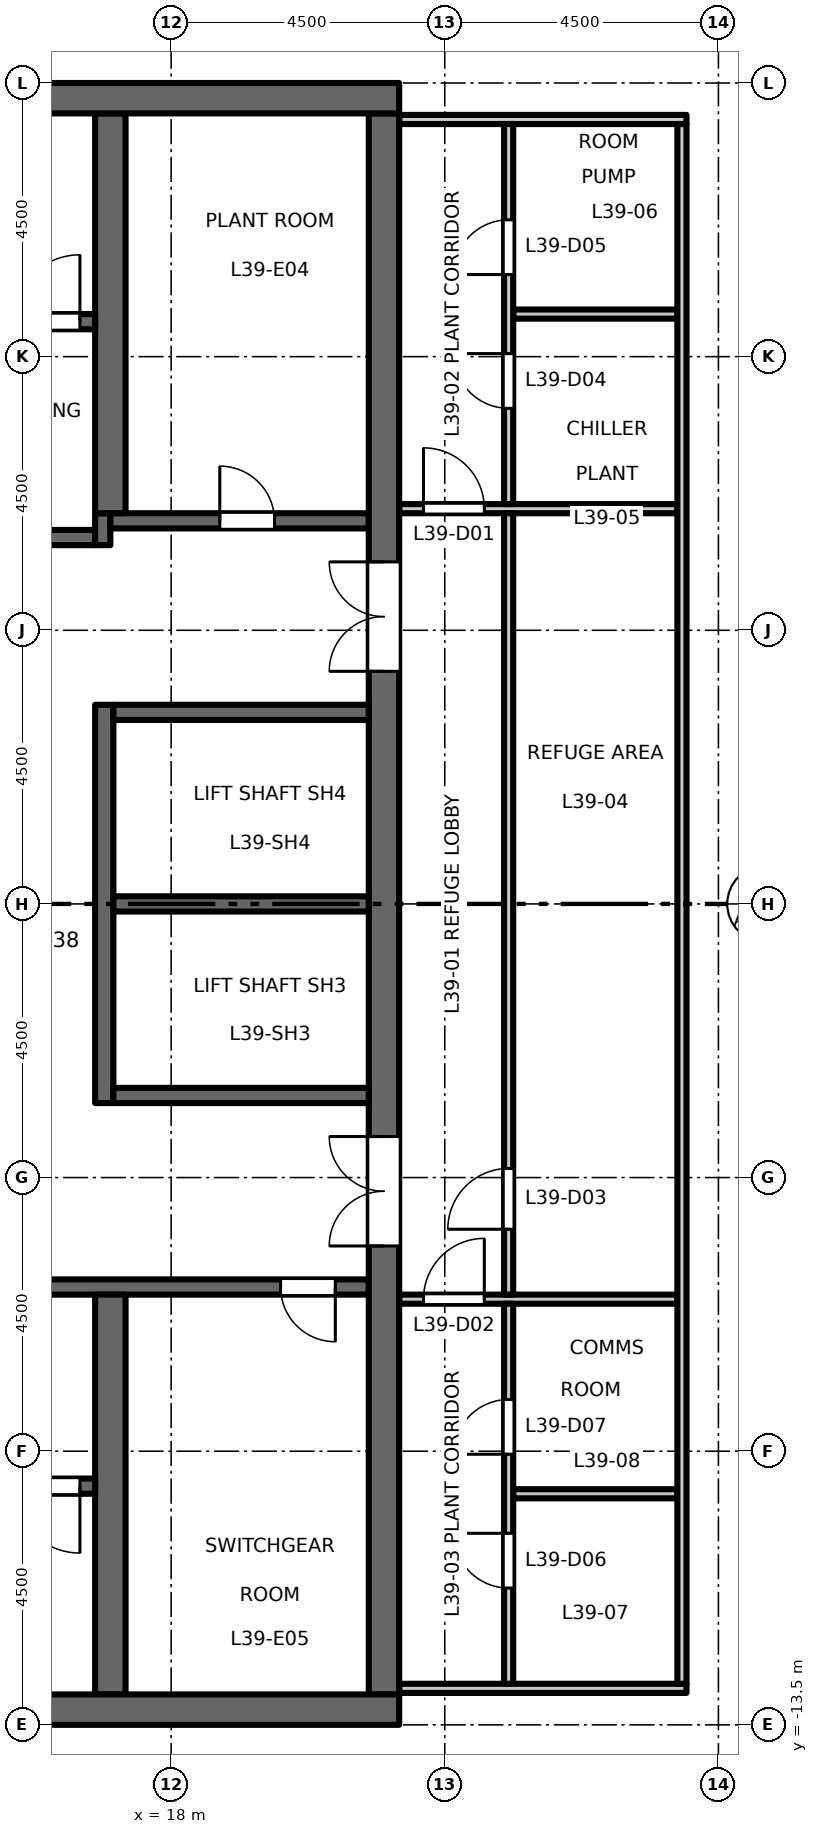
"""IFC4 building model, lengths in metres.
Left out: names, types, materials, properties, quantities, classifications, styles, units other than length and angle.
Written with IfcOpenShell. Run it as: python <this file> out.ifc"""

import sys

from ifc_helpers import new_model, si_unit, direction, frame, frame_2d, origin, place, context, subcontext, project, spatial, rectangle, extrude, element, fill, save


model = new_model("IFC4")
c1 = context("Model", 3, precision=1e-05, world=origin(), true_north=direction((0.0, 1.0)))
c2 = subcontext(c1, "Body", "Model", "MODEL_VIEW")
j1 = project(units=[si_unit("LENGTHUNIT", "METRE"), si_unit("PLANEANGLEUNIT", "RADIAN")], contexts=[c1])
p1 = place(None, origin())
s1 = spatial("IfcSite", under=j1, at=p1, CompositionType="ELEMENT")
p2 = place(p1, origin())
s2 = spatial("IfcBuilding", under=s1, at=p2, CompositionType="ELEMENT")
p3 = place(p2, frame((0.0, 0.0, 181.2)))
s3 = spatial("IfcBuildingStorey", under=s2, at=p3, CompositionType="ELEMENT", Elevation=181.2)
p4 = place(p3, frame((12.15, 6.025, 0.0), z_axis=(0.0, 0.0, 1.0), x_axis=(1.0, 0.0, 0.0)))
e1 = element("IfcWall", 1, at=p4, inside=s3, PredefinedType="SHEAR", context=c2, shape_type="SweptSolid", body=[
    extrude(rectangle(XDim=4.6, YDim=0.25, at=frame_2d((2.3, 0.0))), origin(), (0.0, 0.0, 1.0), 5.8),
])
p5 = place(p4, frame((1.8, 0.0, 0.0)))
e2 = element("IfcOpeningElement", 2, at=p5, cuts=e1, PredefinedType="OPENING", context=c2, shape_type="SweptSolid", body=[
    extrude(rectangle(XDim=1.0, YDim=2.1, at=frame_2d((0.5, 1.05))), frame((0.0, 0.135, 0.0), z_axis=(0.0, -1.0, 0.0), x_axis=(1.0, 0.0, 0.0)), (0.0, 0.0, 1.0), 0.27),
])
p6 = place(p3, frame((16.875, 5.9, 0.0), z_axis=(0.0, 0.0, 1.0), x_axis=(0.0, 1.0, 0.0)))
e3 = element("IfcWall", 3, at=p6, inside=s3, PredefinedType="SHEAR", context=c2, shape_type="SweptSolid", body=[
    extrude(rectangle(XDim=0.525, YDim=0.25, at=frame_2d((0.263, 0.0))), origin(), (0.0, 0.0, 1.0), 5.8),
])
p7 = place(p3, frame((17.0, 6.3, 0.0), z_axis=(0.0, 0.0, 1.0), x_axis=(1.0, 0.0, 0.0)))
e4 = element("IfcWall", 4, at=p7, inside=s3, PredefinedType="SHEAR", context=c2, shape_type="SweptSolid", body=[
    extrude(rectangle(XDim=4.25, YDim=0.25, at=frame_2d((2.125, 0.0))), origin(), (0.0, 0.0, 1.0), 5.8),
])
p8 = place(p7, frame((1.8, 0.0, 0.0)))
e5 = element("IfcOpeningElement", 5, at=p8, cuts=e4, PredefinedType="OPENING", context=c2, shape_type="SweptSolid", body=[
    extrude(rectangle(XDim=0.9, YDim=2.1, at=frame_2d((0.45, 1.05))), frame((0.0, 0.135, 0.0), z_axis=(0.0, -1.0, 0.0), x_axis=(1.0, 0.0, 0.0)), (0.0, 0.0, 1.0), 0.27),
])
p9 = place(p3, frame((12.15, -6.3, 0.0), z_axis=(0.0, 0.0, 1.0), x_axis=(1.0, 0.0, 0.0)))
e6 = element("IfcWall", 6, at=p9, inside=s3, PredefinedType="SHEAR", context=c2, shape_type="SweptSolid", body=[
    extrude(rectangle(XDim=9.1, YDim=0.25, at=frame_2d((4.55, 0.0))), origin(), (0.0, 0.0, 1.0), 5.8),
])
p10 = place(p9, frame((1.8, 0.0, 0.0)))
e7 = element("IfcOpeningElement", 7, at=p10, cuts=e6, PredefinedType="OPENING", context=c2, shape_type="SweptSolid", body=[
    extrude(rectangle(XDim=1.0, YDim=2.1, at=frame_2d((0.5, 1.05))), frame((0.0, 0.135, 0.0), z_axis=(0.0, -1.0, 0.0), x_axis=(1.0, 0.0, 0.0)), (0.0, 0.0, 1.0), 0.27),
])
p11 = place(p9, frame((7.65, 0.0, 0.0)))
e8 = element("IfcOpeningElement", 8, at=p11, cuts=e6, PredefinedType="OPENING", context=c2, shape_type="SweptSolid", body=[
    extrude(rectangle(XDim=0.9, YDim=2.1, at=frame_2d((0.45, 1.05))), frame((0.0, 0.135, 0.0), z_axis=(0.0, -1.0, 0.0), x_axis=(1.0, 0.0, 0.0)), (0.0, 0.0, 1.0), 0.27),
])
p12 = place(p3, frame((21.5, -13.0, 0.0), z_axis=(0.0, 0.0, 1.0), x_axis=(0.0, 1.0, 0.0)))
e9 = element("IfcWall", 9, at=p12, inside=s3, PredefinedType="SHEAR", context=c2, shape_type="SweptSolid", body=[
    extrude(rectangle(XDim=26.0, YDim=0.5, at=frame_2d((13.0, 0.0))), origin(), (0.0, 0.0, 1.0), 5.8),
])
p13 = place(p12, frame((16.825, 0.0, 0.0)))
e10 = element("IfcOpeningElement", 10, at=p13, cuts=e9, PredefinedType="OPENING", context=c2, shape_type="SweptSolid", body=[
    extrude(rectangle(XDim=1.8, YDim=2.1, at=frame_2d((0.9, 1.05))), frame((0.0, 0.26, 0.0), z_axis=(0.0, -1.0, 0.0), x_axis=(1.0, 0.0, 0.0)), (0.0, 0.0, 1.0), 0.52),
])
p14 = place(p12, frame((7.375, 0.0, 0.0)))
e11 = element("IfcOpeningElement", 11, at=p14, cuts=e9, PredefinedType="OPENING", context=c2, shape_type="SweptSolid", body=[
    extrude(rectangle(XDim=1.8, YDim=2.1, at=frame_2d((0.9, 1.05))), frame((0.0, 0.26, 0.0), z_axis=(0.0, -1.0, 0.0), x_axis=(1.0, 0.0, 0.0)), (0.0, 0.0, 1.0), 0.52),
])
p15 = place(p3, frame((16.9, -3.275, 0.0), z_axis=(0.0, 0.0, 1.0), x_axis=(0.0, 1.0, 0.0)))
e12 = element("IfcWall", 12, at=p15, inside=s3, PredefinedType="SHEAR", context=c2, shape_type="SweptSolid", body=[
    extrude(rectangle(XDim=6.55, YDim=0.3, at=frame_2d((3.275, 0.0))), origin(), (0.0, 0.0, 1.0), 5.8),
])
for number, where, z_axis, x_axis in (
    (13, (17.05, 0.0, 0.0), (0.0, 0.0, 1.0), (1.0, 0.0, 0.0)),
    (14, (17.05, 3.15, 0.0), (0.0, 0.0, 1.0), (1.0, 0.0, 0.0)),
    (15, (17.05, -3.15, 0.0), (0.0, 0.0, 1.0), (1.0, 0.0, 0.0)),
):
    element("IfcWall", number, at=place(p3, frame(where, z_axis=z_axis, x_axis=x_axis)), inside=s3, PredefinedType="SHEAR", context=c2, shape_type="SweptSolid", body=[
        extrude(rectangle(XDim=4.2, YDim=0.25, at=frame_2d((2.1, 0.0))), origin(), (0.0, 0.0, 1.0), 5.8),
    ])
for number, where, z_axis, x_axis in (
    (16, (17.0, 6.425, 0.0), (0.0, 0.0, 1.0), (0.0, 1.0, 0.0)),
    (17, (17.0, -13.0, 0.0), (0.0, 0.0, 1.0), (0.0, 1.0, 0.0)),
):
    element("IfcWall", number, at=place(p3, frame(where, z_axis=z_axis, x_axis=x_axis)), inside=s3, PredefinedType="SHEAR", context=c2, shape_type="SweptSolid", body=[
        extrude(rectangle(XDim=6.575, YDim=0.5, at=frame_2d((3.288, 0.0))), origin(), (0.0, 0.0, 1.0), 5.8),
    ])
p16 = place(p3, frame((8.75, 9.575, 0.0), z_axis=(0.0, 0.0, 1.0), x_axis=(1.0, 0.0, 0.0)))
e18 = element("IfcWall", 18, at=p16, inside=s3, PredefinedType="SHEAR", context=c2, shape_type="SweptSolid", body=[
    extrude(rectangle(XDim=8.0, YDim=0.25, at=frame_2d((4.0, 0.0))), origin(), (0.0, 0.0, 1.0), 5.8),
])
p17 = place(p16, frame((6.65, 0.0, 0.0)))
e19 = element("IfcOpeningElement", 19, at=p17, cuts=e18, PredefinedType="OPENING", context=c2, shape_type="SweptSolid", body=[
    extrude(rectangle(XDim=1.1, YDim=2.1, at=frame_2d((0.55, 1.05))), frame((0.0, 0.135, 0.0), z_axis=(0.0, -1.0, 0.0), x_axis=(1.0, 0.0, 0.0)), (0.0, 0.0, 1.0), 0.27),
])
p18 = place(p3, frame((8.75, -9.575, 0.0), z_axis=(0.0, 0.0, 1.0), x_axis=(1.0, 0.0, 0.0)))
e20 = element("IfcWall", 20, at=p18, inside=s3, PredefinedType="SHEAR", context=c2, shape_type="SweptSolid", body=[
    extrude(rectangle(XDim=8.0, YDim=0.25, at=frame_2d((4.0, 0.0))), origin(), (0.0, 0.0, 1.0), 5.8),
])
p19 = place(p18, frame((6.65, 0.0, 0.0)))
e21 = element("IfcOpeningElement", 21, at=p19, cuts=e20, PredefinedType="OPENING", context=c2, shape_type="SweptSolid", body=[
    extrude(rectangle(XDim=1.1, YDim=2.1, at=frame_2d((0.55, 1.05))), frame((0.0, 0.135, 0.0), z_axis=(0.0, -1.0, 0.0), x_axis=(1.0, 0.0, 0.0)), (0.0, 0.0, 1.0), 0.27),
])
for number, where, z_axis, x_axis in (
    (22, (8.25, 13.25, 0.0), (0.0, 0.0, 1.0), (1.0, 0.0, 0.0)),
    (23, (8.25, -13.25, 0.0), (0.0, 0.0, 1.0), (1.0, 0.0, 0.0)),
):
    element("IfcWall", number, at=place(p3, frame(where, z_axis=z_axis, x_axis=x_axis)), inside=s3, PredefinedType="SHEAR", context=c2, shape_type="SweptSolid", body=[
        extrude(rectangle(XDim=13.5, YDim=0.5, at=frame_2d((6.75, 0.0))), origin(), (0.0, 0.0, 1.0), 5.8),
    ])
p20 = place(p3, frame((21.75, -12.9, 0.0), z_axis=(0.0, 0.0, 1.0), x_axis=(1.0, 0.0, 0.0)))
e24 = element("IfcWall", 24, at=p20, inside=s3, PredefinedType="PARTITIONING", context=c2, shape_type="SweptSolid", body=[
    extrude(rectangle(XDim=4.725, YDim=0.15, at=frame_2d((2.363, 0.0))), origin(), (0.0, 0.0, 1.0), 5.8),
])
p21 = place(p3, frame((23.625, -9.7, 0.0), z_axis=(0.0, 0.0, 1.0), x_axis=(1.0, 0.0, 0.0)))
e25 = element("IfcWall", 25, at=p21, inside=s3, PredefinedType="PARTITIONING", context=c2, shape_type="SweptSolid", body=[
    extrude(rectangle(XDim=2.7, YDim=0.15, at=frame_2d((1.35, 0.0))), origin(), (0.0, 0.0, 1.0), 5.8),
])
p22 = place(p3, frame((21.75, -6.5, 0.0), z_axis=(0.0, 0.0, 1.0), x_axis=(1.0, 0.0, 0.0)))
e26 = element("IfcWall", 26, at=p22, inside=s3, PredefinedType="PARTITIONING", context=c2, shape_type="SweptSolid", body=[
    extrude(rectangle(XDim=4.575, YDim=0.15, at=frame_2d((2.288, 0.0))), origin(), (0.0, 0.0, 1.0), 5.8),
])
p23 = place(p22, frame((0.4, 0.0, 0.0)))
e27 = element("IfcOpeningElement", 27, at=p23, cuts=e26, PredefinedType="OPENING", context=c2, shape_type="SweptSolid", body=[
    extrude(rectangle(XDim=1.0, YDim=2.1, at=frame_2d((0.5, 1.05))), frame((0.0, 0.085, 0.0), z_axis=(0.0, -1.0, 0.0), x_axis=(1.0, 0.0, 0.0)), (0.0, 0.0, 1.0), 0.17),
])
p24 = place(p3, frame((21.75, 6.5, 0.0), z_axis=(0.0, 0.0, 1.0), x_axis=(1.0, 0.0, 0.0)))
e28 = element("IfcWall", 28, at=p24, inside=s3, PredefinedType="PARTITIONING", context=c2, shape_type="SweptSolid", body=[
    extrude(rectangle(XDim=4.575, YDim=0.15, at=frame_2d((2.288, 0.0))), origin(), (0.0, 0.0, 1.0), 5.8),
])
p25 = place(p24, frame((0.4, 0.0, 0.0)))
e29 = element("IfcOpeningElement", 29, at=p25, cuts=e28, PredefinedType="OPENING", context=c2, shape_type="SweptSolid", body=[
    extrude(rectangle(XDim=1.0, YDim=2.1, at=frame_2d((0.5, 1.05))), frame((0.0, 0.085, 0.0), z_axis=(0.0, -1.0, 0.0), x_axis=(1.0, 0.0, 0.0)), (0.0, 0.0, 1.0), 0.17),
])
p26 = place(p3, frame((23.625, 9.7, 0.0), z_axis=(0.0, 0.0, 1.0), x_axis=(1.0, 0.0, 0.0)))
e30 = element("IfcWall", 30, at=p26, inside=s3, PredefinedType="PARTITIONING", context=c2, shape_type="SweptSolid", body=[
    extrude(rectangle(XDim=2.7, YDim=0.15, at=frame_2d((1.35, 0.0))), origin(), (0.0, 0.0, 1.0), 5.8),
])
p27 = place(p3, frame((21.75, 12.9, 0.0), z_axis=(0.0, 0.0, 1.0), x_axis=(1.0, 0.0, 0.0)))
e31 = element("IfcWall", 31, at=p27, inside=s3, PredefinedType="PARTITIONING", context=c2, shape_type="SweptSolid", body=[
    extrude(rectangle(XDim=4.725, YDim=0.15, at=frame_2d((2.363, 0.0))), origin(), (0.0, 0.0, 1.0), 5.8),
])
p28 = place(p3, frame((23.55, -12.825, 0.0), z_axis=(0.0, 0.0, 1.0), x_axis=(0.0, 1.0, 0.0)))
e32 = element("IfcWall", 32, at=p28, inside=s3, PredefinedType="PARTITIONING", context=c2, shape_type="SweptSolid", body=[
    extrude(rectangle(XDim=6.25, YDim=0.15, at=frame_2d((3.125, 0.0))), origin(), (0.0, 0.0, 1.0), 5.8),
])
p29 = place(p28, frame((1.575, 0.0, 0.0)))
e33 = element("IfcOpeningElement", 33, at=p29, cuts=e32, PredefinedType="OPENING", context=c2, shape_type="SweptSolid", body=[
    extrude(rectangle(XDim=0.9, YDim=2.1, at=frame_2d((0.45, 1.05))), frame((0.0, 0.085, 0.0), z_axis=(0.0, -1.0, 0.0), x_axis=(1.0, 0.0, 0.0)), (0.0, 0.0, 1.0), 0.17),
])
p30 = place(p28, frame((3.775, 0.0, 0.0)))
e34 = element("IfcOpeningElement", 34, at=p30, cuts=e32, PredefinedType="OPENING", context=c2, shape_type="SweptSolid", body=[
    extrude(rectangle(XDim=0.9, YDim=2.1, at=frame_2d((0.45, 1.05))), frame((0.0, 0.085, 0.0), z_axis=(0.0, -1.0, 0.0), x_axis=(1.0, 0.0, 0.0)), (0.0, 0.0, 1.0), 0.17),
])
p31 = place(p3, frame((23.55, -6.425, 0.0), z_axis=(0.0, 0.0, 1.0), x_axis=(0.0, 1.0, 0.0)))
e35 = element("IfcWall", 35, at=p31, inside=s3, PredefinedType="PARTITIONING", context=c2, shape_type="SweptSolid", body=[
    extrude(rectangle(XDim=12.85, YDim=0.15, at=frame_2d((6.425, 0.0))), origin(), (0.0, 0.0, 1.0), 5.8),
])
p32 = place(p31, frame((1.075, 0.0, 0.0)))
e36 = element("IfcOpeningElement", 36, at=p32, cuts=e35, PredefinedType="OPENING", context=c2, shape_type="SweptSolid", body=[
    extrude(rectangle(XDim=1.0, YDim=2.1, at=frame_2d((0.5, 1.05))), frame((0.0, 0.085, 0.0), z_axis=(0.0, -1.0, 0.0), x_axis=(1.0, 0.0, 0.0)), (0.0, 0.0, 1.0), 0.17),
])
p33 = place(p3, frame((23.55, 6.575, 0.0), z_axis=(0.0, 0.0, 1.0), x_axis=(0.0, 1.0, 0.0)))
e37 = element("IfcWall", 37, at=p33, inside=s3, PredefinedType="PARTITIONING", context=c2, shape_type="SweptSolid", body=[
    extrude(rectangle(XDim=6.25, YDim=0.15, at=frame_2d((3.125, 0.0))), origin(), (0.0, 0.0, 1.0), 5.8),
])
p34 = place(p33, frame((1.575, 0.0, 0.0)))
e38 = element("IfcOpeningElement", 38, at=p34, cuts=e37, PredefinedType="OPENING", context=c2, shape_type="SweptSolid", body=[
    extrude(rectangle(XDim=0.9, YDim=2.1, at=frame_2d((0.45, 1.05))), frame((0.0, 0.085, 0.0), z_axis=(0.0, -1.0, 0.0), x_axis=(1.0, 0.0, 0.0)), (0.0, 0.0, 1.0), 0.17),
])
p35 = place(p33, frame((3.775, 0.0, 0.0)))
e39 = element("IfcOpeningElement", 39, at=p35, cuts=e37, PredefinedType="OPENING", context=c2, shape_type="SweptSolid", body=[
    extrude(rectangle(XDim=0.9, YDim=2.1, at=frame_2d((0.45, 1.05))), frame((0.0, 0.085, 0.0), z_axis=(0.0, -1.0, 0.0), x_axis=(1.0, 0.0, 0.0)), (0.0, 0.0, 1.0), 0.17),
])
p36 = place(p3, frame((26.4, -12.825, 0.0), z_axis=(0.0, 0.0, 1.0), x_axis=(0.0, 1.0, 0.0)))
e40 = element("IfcWall", 40, at=p36, inside=s3, PredefinedType="PARTITIONING", context=c2, shape_type="SweptSolid", body=[
    extrude(rectangle(XDim=25.65, YDim=0.15, at=frame_2d((12.825, 0.0))), origin(), (0.0, 0.0, 1.0), 5.8),
])
p37 = place(p17, origin())
e41 = element("IfcDoor", 41, at=p37, inside=s3, OperationType="SINGLE_SWING_LEFT", PredefinedType="DOOR", context=c2, shape_type="SweptSolid", body=[
    extrude(rectangle(XDim=1.1, YDim=2.1, at=frame_2d((0.55, 1.05))), frame((0.0, 0.025, 0.0), z_axis=(0.0, -1.0, 0.0), x_axis=(1.0, 0.0, 0.0)), (0.0, 0.0, 1.0), 0.05),
])
fill(e19, e41)
p38 = place(p19, origin())
e42 = element("IfcDoor", 42, at=p38, inside=s3, OperationType="SINGLE_SWING_RIGHT", PredefinedType="DOOR", context=c2, shape_type="SweptSolid", body=[
    extrude(rectangle(XDim=1.1, YDim=2.1, at=frame_2d((0.55, 1.05))), frame((0.0, 0.025, 0.0), z_axis=(0.0, -1.0, 0.0), x_axis=(1.0, 0.0, 0.0)), (0.0, 0.0, 1.0), 0.05),
])
fill(e21, e42)
p39 = place(p13, origin())
e43 = element("IfcDoor", 43, at=p39, inside=s3, OperationType="DOUBLE_DOOR_DOUBLE_SWING", PredefinedType="DOOR", context=c2, shape_type="SweptSolid", body=[
    extrude(rectangle(XDim=1.8, YDim=2.1, at=frame_2d((0.9, 1.05))), frame((0.0, 0.025, 0.0), z_axis=(0.0, -1.0, 0.0), x_axis=(1.0, 0.0, 0.0)), (0.0, 0.0, 1.0), 0.05),
])
fill(e10, e43)
p40 = place(p14, origin())
e44 = element("IfcDoor", 44, at=p40, inside=s3, OperationType="DOUBLE_DOOR_DOUBLE_SWING", PredefinedType="DOOR", context=c2, shape_type="SweptSolid", body=[
    extrude(rectangle(XDim=1.8, YDim=2.1, at=frame_2d((0.9, 1.05))), frame((0.0, 0.025, 0.0), z_axis=(0.0, -1.0, 0.0), x_axis=(1.0, 0.0, 0.0)), (0.0, 0.0, 1.0), 0.05),
])
fill(e11, e44)
p41 = place(p8, origin())
e45 = element("IfcDoor", 45, at=p41, inside=s3, OperationType="SINGLE_SWING_RIGHT", PredefinedType="DOOR", context=c2, shape_type="SweptSolid", body=[
    extrude(rectangle(XDim=0.9, YDim=2.1, at=frame_2d((0.45, 1.05))), frame((0.0, 0.025, 0.0), z_axis=(0.0, -1.0, 0.0), x_axis=(1.0, 0.0, 0.0)), (0.0, 0.0, 1.0), 0.05),
])
fill(e5, e45)
p42 = place(p11, origin())
e46 = element("IfcDoor", 46, at=p42, inside=s3, OperationType="SINGLE_SWING_RIGHT", PredefinedType="DOOR", context=c2, shape_type="SweptSolid", body=[
    extrude(rectangle(XDim=0.9, YDim=2.1, at=frame_2d((0.45, 1.05))), frame((0.0, 0.025, 0.0), z_axis=(0.0, -1.0, 0.0), x_axis=(1.0, 0.0, 0.0)), (0.0, 0.0, 1.0), 0.05),
])
fill(e8, e46)
p43 = place(p25, origin())
e47 = element("IfcDoor", 47, at=p43, inside=s3, OperationType="SINGLE_SWING_LEFT", PredefinedType="DOOR", context=c2, shape_type="SweptSolid", body=[
    extrude(rectangle(XDim=1.0, YDim=2.1, at=frame_2d((0.5, 1.05))), frame((0.0, 0.025, 0.0), z_axis=(0.0, -1.0, 0.0), x_axis=(1.0, 0.0, 0.0)), (0.0, 0.0, 1.0), 0.05),
])
fill(e29, e47)
p44 = place(p23, origin())
e48 = element("IfcDoor", 48, at=p44, inside=s3, OperationType="SINGLE_SWING_RIGHT", PredefinedType="DOOR", context=c2, shape_type="SweptSolid", body=[
    extrude(rectangle(XDim=1.0, YDim=2.1, at=frame_2d((0.5, 1.05))), frame((0.0, 0.025, 0.0), z_axis=(0.0, -1.0, 0.0), x_axis=(1.0, 0.0, 0.0)), (0.0, 0.0, 1.0), 0.05),
])
fill(e27, e48)
p45 = place(p32, origin())
e49 = element("IfcDoor", 49, at=p45, inside=s3, OperationType="SINGLE_SWING_LEFT", PredefinedType="DOOR", context=c2, shape_type="SweptSolid", body=[
    extrude(rectangle(XDim=1.0, YDim=2.1, at=frame_2d((0.5, 1.05))), frame((0.0, 0.025, 0.0), z_axis=(0.0, -1.0, 0.0), x_axis=(1.0, 0.0, 0.0)), (0.0, 0.0, 1.0), 0.05),
])
fill(e36, e49)
p46 = place(p34, origin())
e50 = element("IfcDoor", 50, at=p46, inside=s3, OperationType="SINGLE_SWING_RIGHT", PredefinedType="DOOR", context=c2, shape_type="SweptSolid", body=[
    extrude(rectangle(XDim=0.9, YDim=2.1, at=frame_2d((0.45, 1.05))), frame((0.0, 0.025, 0.0), z_axis=(0.0, -1.0, 0.0), x_axis=(1.0, 0.0, 0.0)), (0.0, 0.0, 1.0), 0.05),
])
fill(e38, e50)
p47 = place(p35, origin())
e51 = element("IfcDoor", 51, at=p47, inside=s3, OperationType="SINGLE_SWING_LEFT", PredefinedType="DOOR", context=c2, shape_type="SweptSolid", body=[
    extrude(rectangle(XDim=0.9, YDim=2.1, at=frame_2d((0.45, 1.05))), frame((0.0, 0.025, 0.0), z_axis=(0.0, -1.0, 0.0), x_axis=(1.0, 0.0, 0.0)), (0.0, 0.0, 1.0), 0.05),
])
fill(e39, e51)
p48 = place(p29, origin())
e52 = element("IfcDoor", 52, at=p48, inside=s3, OperationType="SINGLE_SWING_RIGHT", PredefinedType="DOOR", context=c2, shape_type="SweptSolid", body=[
    extrude(rectangle(XDim=0.9, YDim=2.1, at=frame_2d((0.45, 1.05))), frame((0.0, 0.025, 0.0), z_axis=(0.0, -1.0, 0.0), x_axis=(1.0, 0.0, 0.0)), (0.0, 0.0, 1.0), 0.05),
])
fill(e33, e52)
p49 = place(p30, origin())
e53 = element("IfcDoor", 53, at=p49, inside=s3, OperationType="SINGLE_SWING_LEFT", PredefinedType="DOOR", context=c2, shape_type="SweptSolid", body=[
    extrude(rectangle(XDim=0.9, YDim=2.1, at=frame_2d((0.45, 1.05))), frame((0.0, 0.025, 0.0), z_axis=(0.0, -1.0, 0.0), x_axis=(1.0, 0.0, 0.0)), (0.0, 0.0, 1.0), 0.05),
])
fill(e34, e53)
save(model, sys.argv[1])
